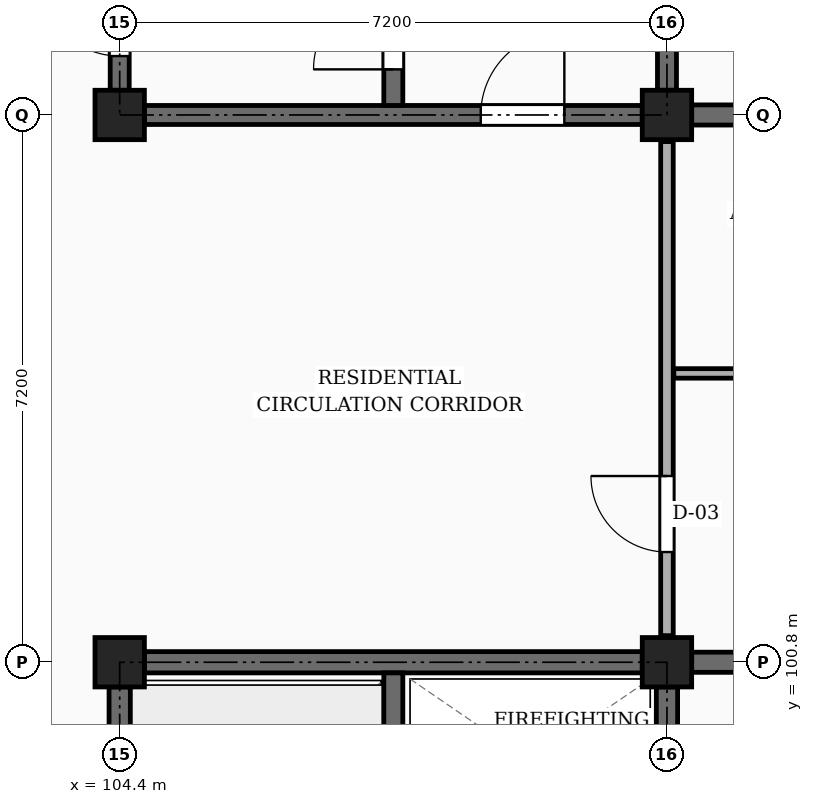
"""IFC4 building model, lengths in metres.
Left out: names, types, materials, properties, quantities, classifications, styles, units other than length and angle.
Written with IfcOpenShell. Run it as: python <this file> out.ifc"""

import sys

from ifc_helpers import new_model, si_unit, direction, frame, frame_2d, origin, origin_2d, place, context, subcontext, project, spatial, rectangle, extrude, element, fill, save


model = new_model("IFC4")
c1 = context("Model", 3, precision=1e-05, world=origin(), true_north=direction((0.0, 1.0)))
c2 = subcontext(c1, "Body", "Model", "MODEL_VIEW")
j1 = project(units=[si_unit("LENGTHUNIT", "METRE"), si_unit("PLANEANGLEUNIT", "RADIAN")], contexts=[c1])
p1 = place(None, origin())
s1 = spatial("IfcSite", under=j1, at=p1, CompositionType="ELEMENT")
p2 = place(p1, origin())
s2 = spatial("IfcBuilding", under=s1, at=p2, CompositionType="ELEMENT")
p3 = place(p2, frame((0.0, 0.0, 4.5)))
s3 = spatial("IfcBuildingStorey", under=s2, at=p3, CompositionType="ELEMENT", Elevation=4.5)
for number, where, z_axis, x_axis in (
    (1, (104.4, 100.8, 0.0), (0.0, 0.0, 1.0), (1.0, 0.0, 0.0)),
    (2, (104.4, 108.0, 0.0), (0.0, 0.0, 1.0), (1.0, 0.0, 0.0)),
    (3, (111.6, 100.8, 0.0), (0.0, 0.0, 1.0), (1.0, 0.0, 0.0)),
    (4, (111.6, 108.0, 0.0), (0.0, 0.0, 1.0), (1.0, 0.0, 0.0)),
):
    element("IfcColumn", number, at=place(p3, frame(where, z_axis=z_axis, x_axis=x_axis)), inside=s3, PredefinedType="COLUMN", context=c2, shape_type="SweptSolid", body=[
        extrude(rectangle(XDim=0.65, YDim=0.65, at=origin_2d()), origin(), (0.0, 0.0, 1.0), 3.15),
    ])
p4 = place(p3, frame((111.925, 100.8, 0.0), z_axis=(0.0, 0.0, 1.0), x_axis=(1.0, 0.0, 0.0)))
e5 = element("IfcWall", 5, at=p4, inside=s3, PredefinedType="SOLIDWALL", context=c2, shape_type="SweptSolid", body=[
    extrude(rectangle(XDim=6.575, YDim=0.265, at=frame_2d((3.288, 0.0))), origin(), (0.0, 0.0, 1.0), 2.19),
])
p5 = place(p3, frame((111.925, 108.0, 0.0), z_axis=(0.0, 0.0, 1.0), x_axis=(1.0, 0.0, 0.0)))
e6 = element("IfcWall", 6, at=p5, inside=s3, PredefinedType="SOLIDWALL", context=c2, shape_type="SweptSolid", body=[
    extrude(rectangle(XDim=6.575, YDim=0.265, at=frame_2d((3.288, 0.0))), origin(), (0.0, 0.0, 1.0), 2.19),
])
p6 = place(p5, frame((4.35, 0.0, 0.0)))
e7 = element("IfcOpeningElement", 7, at=p6, cuts=e6, PredefinedType="OPENING", context=c2, shape_type="SweptSolid", body=[
    extrude(rectangle(XDim=0.98, YDim=2.12, at=frame_2d((0.49, 1.06))), frame((0.0, 0.143, 0.0), z_axis=(0.0, -1.0, 0.0), x_axis=(1.0, 0.0, 0.0)), (0.0, 0.0, 1.0), 0.285),
])
p7 = place(p3, frame((104.4, 93.925, 0.0), z_axis=(0.0, 0.0, 1.0), x_axis=(0.0, 1.0, 0.0)))
e8 = element("IfcWall", 8, at=p7, inside=s3, PredefinedType="SHEAR", context=c2, shape_type="SweptSolid", body=[
    extrude(rectangle(XDim=6.55, YDim=0.28, at=frame_2d((3.275, 0.0))), origin(), (0.0, 0.0, 1.0), 2.89),
])
p8 = place(p7, frame((0.45, 0.0, 0.0)))
e9 = element("IfcOpeningElement", 9, at=p8, cuts=e8, PredefinedType="OPENING", context=c2, shape_type="SweptSolid", body=[
    extrude(rectangle(XDim=1.05, YDim=2.15, at=frame_2d((0.525, 1.075))), frame((0.0, 0.15, 0.0), z_axis=(0.0, -1.0, 0.0), x_axis=(1.0, 0.0, 0.0)), (0.0, 0.0, 1.0), 0.3),
])
p9 = place(p3, frame((104.725, 100.8, 0.0), z_axis=(0.0, 0.0, 1.0), x_axis=(1.0, 0.0, 0.0)))
e10 = element("IfcWall", 10, at=p9, inside=s3, PredefinedType="SHEAR", context=c2, shape_type="SweptSolid", body=[
    extrude(rectangle(XDim=6.55, YDim=0.28, at=frame_2d((3.275, 0.0))), origin(), (0.0, 0.0, 1.0), 2.89),
])
p10 = place(p3, frame((111.6, 93.925, 0.0), z_axis=(0.0, 0.0, 1.0), x_axis=(0.0, 1.0, 0.0)))
e11 = element("IfcWall", 11, at=p10, inside=s3, PredefinedType="SHEAR", context=c2, shape_type="SweptSolid", body=[
    extrude(rectangle(XDim=6.55, YDim=0.28, at=frame_2d((3.275, 0.0))), origin(), (0.0, 0.0, 1.0), 2.89),
])
p11 = place(p3, frame((108.0, 93.74, 0.0), z_axis=(0.0, 0.0, 1.0), x_axis=(0.0, 1.0, 0.0)))
e12 = element("IfcWall", 12, at=p11, inside=s3, PredefinedType="SHEAR", context=c2, shape_type="SweptSolid", body=[
    extrude(rectangle(XDim=6.92, YDim=0.25, at=frame_2d((3.46, 0.0))), origin(), (0.0, 0.0, 1.0), 2.89),
])
p12 = place(p11, frame((0.46, 0.0, 0.0)))
e13 = element("IfcOpeningElement", 13, at=p12, cuts=e12, PredefinedType="OPENING", context=c2, shape_type="SweptSolid", body=[
    extrude(rectangle(XDim=1.05, YDim=2.15, at=frame_2d((0.525, 1.075))), frame((0.0, 0.135, 0.0), z_axis=(0.0, -1.0, 0.0), x_axis=(1.0, 0.0, 0.0)), (0.0, 0.0, 1.0), 0.27),
])
p13 = place(p3, frame((104.4, 108.325, 0.0), z_axis=(0.0, 0.0, 1.0), x_axis=(0.0, 1.0, 0.0)))
e14 = element("IfcWall", 14, at=p13, inside=s3, PredefinedType="SHEAR", context=c2, shape_type="SweptSolid", body=[
    extrude(rectangle(XDim=6.55, YDim=0.25, at=frame_2d((3.275, 0.0))), origin(), (0.0, 0.0, 1.0), 2.89),
])
p14 = place(p13, frame((0.45, 0.0, 0.0)))
e15 = element("IfcOpeningElement", 15, at=p14, cuts=e14, PredefinedType="OPENING", context=c2, shape_type="SweptSolid", body=[
    extrude(rectangle(XDim=1.05, YDim=2.15, at=frame_2d((0.525, 1.075))), frame((0.0, 0.135, 0.0), z_axis=(0.0, -1.0, 0.0), x_axis=(1.0, 0.0, 0.0)), (0.0, 0.0, 1.0), 0.27),
])
p15 = place(p3, frame((111.6, 108.325, 0.0), z_axis=(0.0, 0.0, 1.0), x_axis=(0.0, 1.0, 0.0)))
e16 = element("IfcWall", 16, at=p15, inside=s3, PredefinedType="SHEAR", context=c2, shape_type="SweptSolid", body=[
    extrude(rectangle(XDim=6.55, YDim=0.25, at=frame_2d((3.275, 0.0))), origin(), (0.0, 0.0, 1.0), 2.89),
])
p16 = place(p3, frame((104.725, 108.0, 0.0), z_axis=(0.0, 0.0, 1.0), x_axis=(1.0, 0.0, 0.0)))
e17 = element("IfcWall", 17, at=p16, inside=s3, PredefinedType="SHEAR", context=c2, shape_type="SweptSolid", body=[
    extrude(rectangle(XDim=6.55, YDim=0.25, at=frame_2d((3.275, 0.0))), origin(), (0.0, 0.0, 1.0), 2.89),
])
p17 = place(p16, frame((4.425, 0.0, 0.0)))
e18 = element("IfcOpeningElement", 18, at=p17, cuts=e17, PredefinedType="OPENING", context=c2, shape_type="SweptSolid", body=[
    extrude(rectangle(XDim=1.1, YDim=2.15, at=frame_2d((0.55, 1.075))), frame((0.0, 0.135, 0.0), z_axis=(0.0, -1.0, 0.0), x_axis=(1.0, 0.0, 0.0)), (0.0, 0.0, 1.0), 0.27),
])
p18 = place(p3, frame((108.0, 108.125, 0.0), z_axis=(0.0, 0.0, 1.0), x_axis=(0.0, 1.0, 0.0)))
e19 = element("IfcWall", 19, at=p18, inside=s3, PredefinedType="SHEAR", context=c2, shape_type="SweptSolid", body=[
    extrude(rectangle(XDim=6.95, YDim=0.25, at=frame_2d((3.475, 0.0))), origin(), (0.0, 0.0, 1.0), 2.89),
])
p19 = place(p18, frame((0.475, 0.0, 0.0)))
e20 = element("IfcOpeningElement", 20, at=p19, cuts=e19, PredefinedType="OPENING", context=c2, shape_type="SweptSolid", body=[
    extrude(rectangle(XDim=1.05, YDim=2.15, at=frame_2d((0.525, 1.075))), frame((0.0, 0.135, 0.0), z_axis=(0.0, -1.0, 0.0), x_axis=(1.0, 0.0, 0.0)), (0.0, 0.0, 1.0), 0.27),
])
p20 = place(p3, frame((111.6, 101.15, 0.0), z_axis=(0.0, 0.0, 1.0), x_axis=(0.0, 1.0, 0.0)))
e21 = element("IfcWall", 21, at=p20, inside=s3, PredefinedType="PARTITIONING", context=c2, shape_type="SweptSolid", body=[
    extrude(rectangle(XDim=6.5, YDim=0.165, at=frame_2d((3.25, 0.0))), origin(), (0.0, 0.0, 1.0), 2.24),
])
p21 = place(p20, frame((1.1, 0.0, 0.0)))
e22 = element("IfcOpeningElement", 22, at=p21, cuts=e21, PredefinedType="OPENING", context=c2, shape_type="SweptSolid", body=[
    extrude(rectangle(XDim=1.0, YDim=2.15, at=frame_2d((0.5, 1.075))), frame((0.0, 0.093, 0.0), z_axis=(0.0, -1.0, 0.0), x_axis=(1.0, 0.0, 0.0)), (0.0, 0.0, 1.0), 0.185),
])
p22 = place(p3, frame((111.69, 104.6, 0.0), z_axis=(0.0, 0.0, 1.0), x_axis=(1.0, 0.0, 0.0)))
e23 = element("IfcWall", 23, at=p22, inside=s3, PredefinedType="PARTITIONING", context=c2, shape_type="SweptSolid", body=[
    extrude(rectangle(XDim=6.935, YDim=0.125, at=frame_2d((3.468, 0.0))), origin(), (0.0, 0.0, 1.0), 2.325),
])
p23 = place(p22, frame((1.1, 0.0, 0.0)))
e24 = element("IfcOpeningElement", 24, at=p23, cuts=e23, PredefinedType="OPENING", context=c2, shape_type="SweptSolid", body=[
    extrude(rectangle(XDim=0.87, YDim=2.05, at=frame_2d((0.435, 1.025))), frame((0.0, 0.073, 0.0), z_axis=(0.0, -1.0, 0.0), x_axis=(1.0, 0.0, 0.0)), (0.0, 0.0, 1.0), 0.145),
])
p24 = place(p22, frame((4.5, 0.0, 0.0)))
e25 = element("IfcOpeningElement", 25, at=p24, cuts=e23, PredefinedType="OPENING", context=c2, shape_type="SweptSolid", body=[
    extrude(rectangle(XDim=0.92, YDim=2.1, at=frame_2d((0.46, 1.05))), frame((0.0, 0.073, 0.0), z_axis=(0.0, -1.0, 0.0), x_axis=(1.0, 0.0, 0.0)), (0.0, 0.0, 1.0), 0.145),
])
p25 = place(p14, origin())
e26 = element("IfcDoor", 26, at=p25, inside=s3, OperationType="SINGLE_SWING_RIGHT", PredefinedType="DOOR", context=c2, shape_type="SweptSolid", body=[
    extrude(rectangle(XDim=1.05, YDim=2.15, at=frame_2d((0.525, 1.075))), frame((0.0, 0.025, 0.0), z_axis=(0.0, -1.0, 0.0), x_axis=(1.0, 0.0, 0.0)), (0.0, 0.0, 1.0), 0.05),
])
fill(e15, e26)
p26 = place(p17, frame((1.1, 0.0, 0.0), z_axis=(0.0, 0.0, 1.0), x_axis=(-1.0, 0.0, 0.0)))
e27 = element("IfcDoor", 27, at=p26, inside=s3, OperationType="SINGLE_SWING_RIGHT", PredefinedType="DOOR", context=c2, shape_type="SweptSolid", body=[
    extrude(rectangle(XDim=1.1, YDim=2.15, at=frame_2d((0.55, 1.075))), frame((0.0, 0.025, 0.0), z_axis=(0.0, -1.0, 0.0), x_axis=(1.0, 0.0, 0.0)), (0.0, 0.0, 1.0), 0.05),
])
fill(e18, e27)
p27 = place(p19, origin())
e28 = element("IfcDoor", 28, at=p27, inside=s3, OperationType="SINGLE_SWING_LEFT", PredefinedType="DOOR", context=c2, shape_type="SweptSolid", body=[
    extrude(rectangle(XDim=1.05, YDim=2.15, at=frame_2d((0.525, 1.075))), frame((0.0, 0.025, 0.0), z_axis=(0.0, -1.0, 0.0), x_axis=(1.0, 0.0, 0.0)), (0.0, 0.0, 1.0), 0.05),
])
fill(e20, e28)
p28 = place(p21, origin())
e29 = element("IfcDoor", 29, at=p28, inside=s3, OperationType="SINGLE_SWING_RIGHT", PredefinedType="DOOR", context=c2, shape_type="SweptSolid", body=[
    extrude(rectangle(XDim=1.0, YDim=2.15, at=frame_2d((0.5, 1.075))), frame((0.0, 0.025, 0.0), z_axis=(0.0, -1.0, 0.0), x_axis=(1.0, 0.0, 0.0)), (0.0, 0.0, 1.0), 0.05),
])
fill(e22, e29)
save(model, sys.argv[1])
